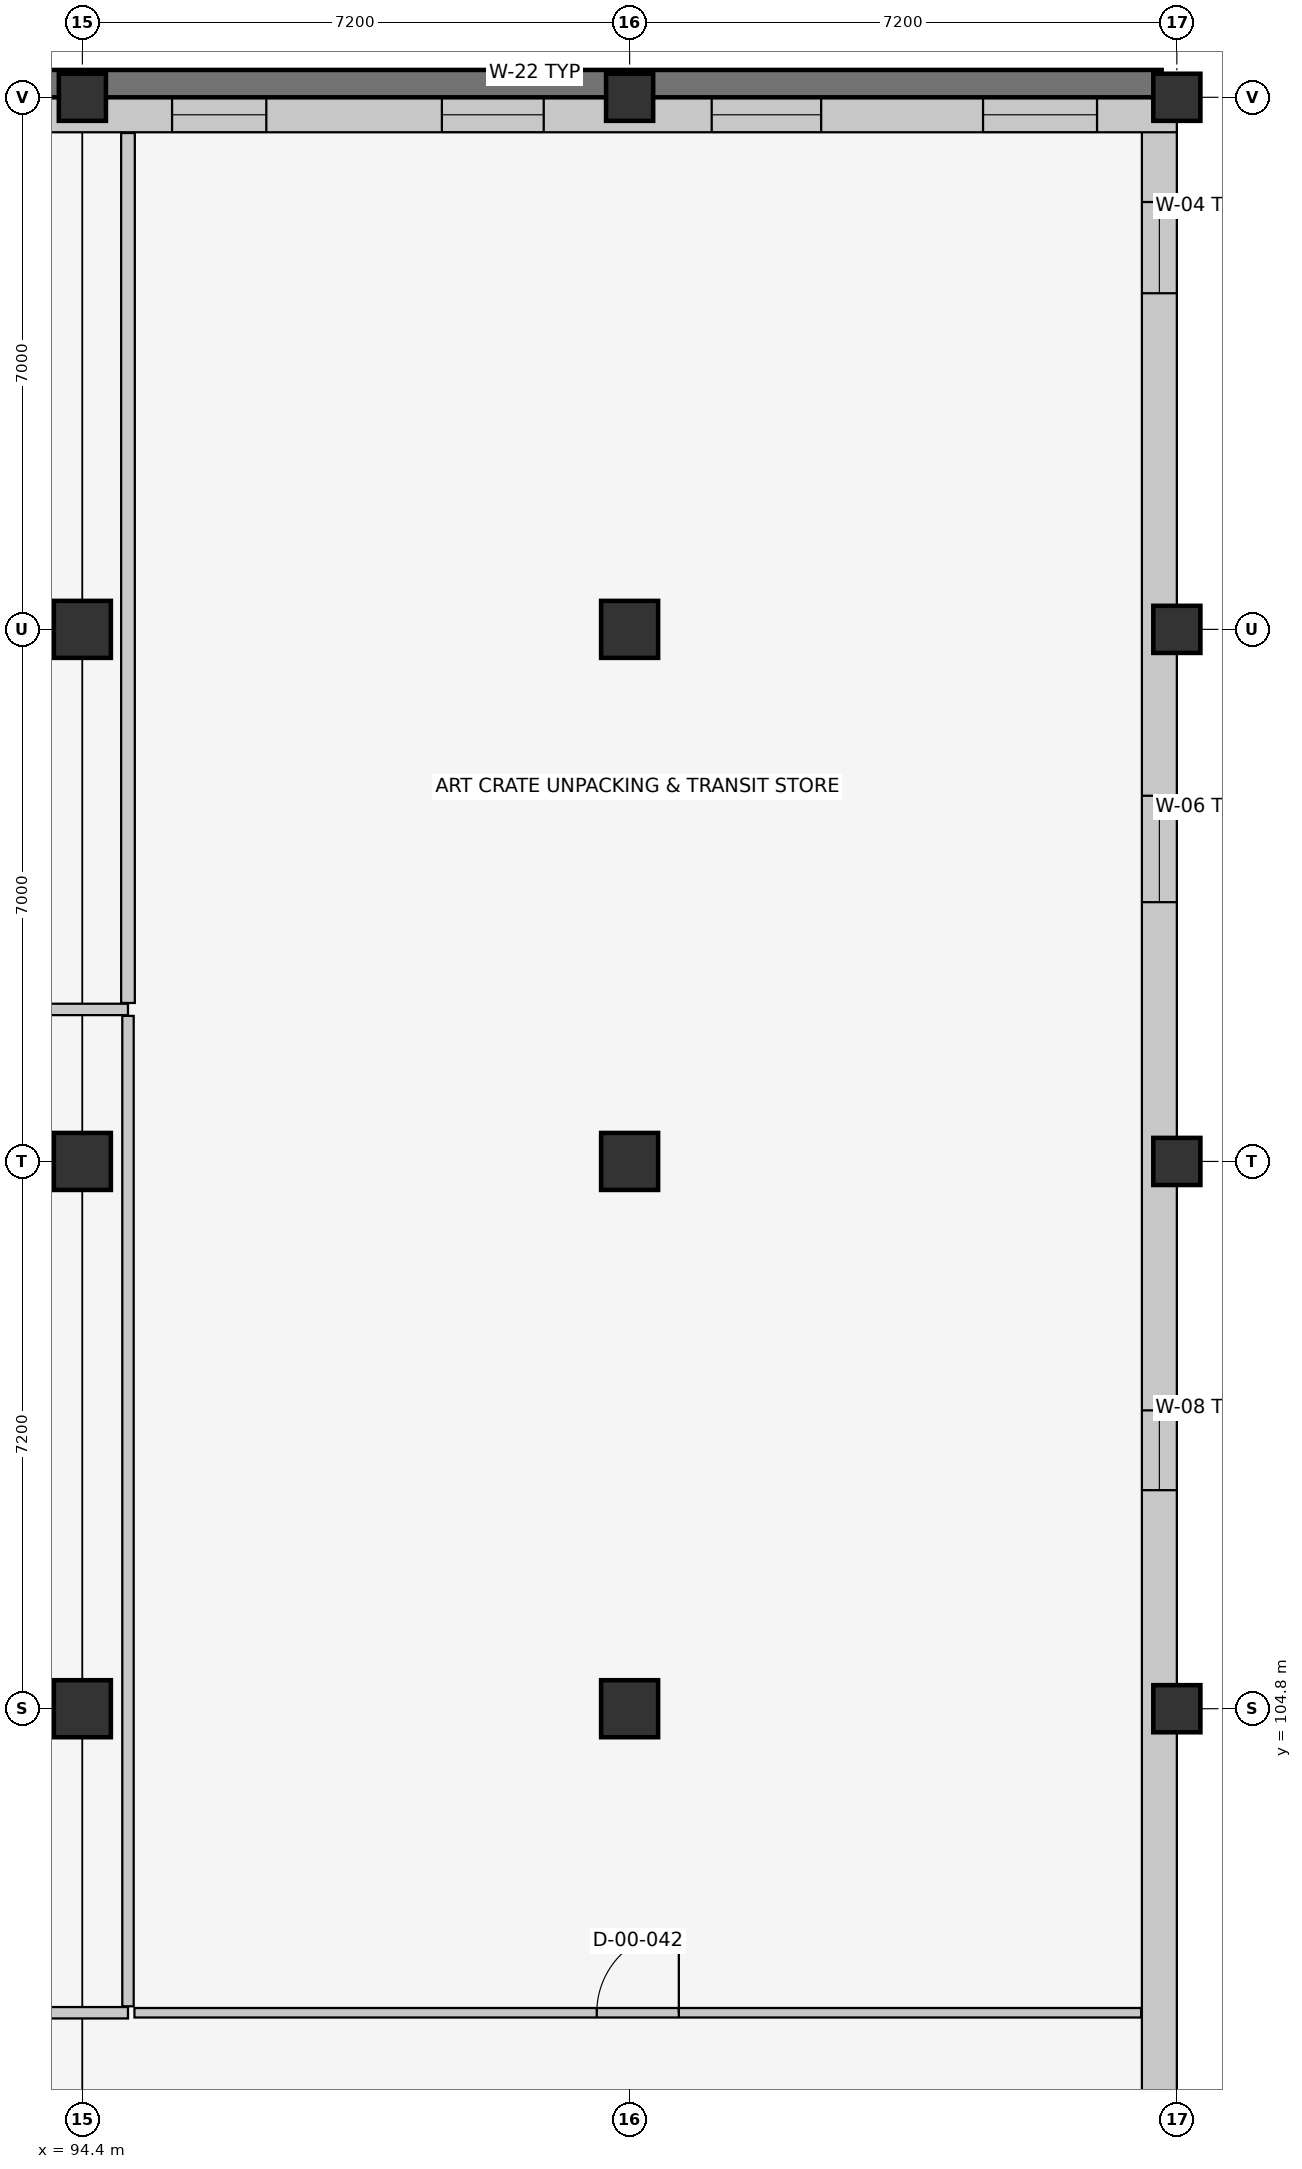
"""IFC4 building model, lengths in metres.
Left out: names, types, materials, properties, quantities, classifications, styles, units other than length and angle.
Written with IfcOpenShell. Run it as: python <this file> out.ifc"""

import sys

from ifc_helpers import new_model, si_unit, direction, frame, frame_2d, origin, origin_2d, place, context, subcontext, project, spatial, rectangle, circle, extrude, element, fill, save


model = new_model("IFC4")
c1 = context("Model", 3, precision=1e-05, world=origin(), true_north=direction((0.0, 1.0)))
c2 = subcontext(c1, "Body", "Model", "MODEL_VIEW")
j1 = project(units=[si_unit("LENGTHUNIT", "METRE"), si_unit("PLANEANGLEUNIT", "RADIAN")], contexts=[c1])
p1 = place(None, origin())
s1 = spatial("IfcSite", under=j1, at=p1, CompositionType="ELEMENT")
p2 = place(p1, origin())
s2 = spatial("IfcBuilding", under=s1, at=p2, CompositionType="ELEMENT")
p3 = place(p2, origin())
s3 = spatial("IfcBuildingStorey", under=s2, at=p3, CompositionType="ELEMENT", Elevation=0.0)
for number, where, z_axis, x_axis in (
    (1, (94.4, 104.8, 0.0), (0.0, 0.0, 1.0), (1.0, 0.0, 0.0)),
    (2, (94.4, 112.0, 0.0), (0.0, 0.0, 1.0), (1.0, 0.0, 0.0)),
    (3, (94.4, 119.0, 0.0), (0.0, 0.0, 1.0), (1.0, 0.0, 0.0)),
):
    element("IfcColumn", number, at=place(p3, frame(where, z_axis=z_axis, x_axis=x_axis)), inside=s3, PredefinedType="COLUMN", context=c2, shape_type="SweptSolid", body=[
        extrude(circle(Radius=0.375, at=origin_2d()), origin(), (0.0, 0.0, 1.0), 5.4),
    ])
p4 = place(p3, frame((94.4, 126.0, 0.0), z_axis=(0.0, 0.0, 1.0), x_axis=(1.0, 0.0, 0.0)))
e4 = element("IfcColumn", 4, at=p4, inside=s3, PredefinedType="COLUMN", context=c2, shape_type="SweptSolid", body=[
    extrude(rectangle(XDim=0.62, YDim=0.62, at=origin_2d()), origin(), (0.0, 0.0, 1.0), 5.4),
])
for number, where, z_axis, x_axis in (
    (5, (101.6, 104.8, 0.0), (0.0, 0.0, 1.0), (1.0, 0.0, 0.0)),
    (6, (101.6, 112.0, 0.0), (0.0, 0.0, 1.0), (1.0, 0.0, 0.0)),
    (7, (101.6, 119.0, 0.0), (0.0, 0.0, 1.0), (1.0, 0.0, 0.0)),
):
    element("IfcColumn", number, at=place(p3, frame(where, z_axis=z_axis, x_axis=x_axis)), inside=s3, PredefinedType="COLUMN", context=c2, shape_type="SweptSolid", body=[
        extrude(circle(Radius=0.375, at=origin_2d()), origin(), (0.0, 0.0, 1.0), 5.4),
    ])
for number, where, z_axis, x_axis in (
    (8, (101.6, 126.0, 0.0), (0.0, 0.0, 1.0), (1.0, 0.0, 0.0)),
    (9, (108.8, 104.8, 0.0), (0.0, 0.0, 1.0), (1.0, 0.0, 0.0)),
    (10, (108.8, 112.0, 0.0), (0.0, 0.0, 1.0), (1.0, 0.0, 0.0)),
    (11, (108.8, 119.0, 0.0), (0.0, 0.0, 1.0), (1.0, 0.0, 0.0)),
    (12, (108.8, 126.0, 0.0), (0.0, 0.0, 1.0), (1.0, 0.0, 0.0)),
):
    element("IfcColumn", number, at=place(p3, frame(where, z_axis=z_axis, x_axis=x_axis)), inside=s3, PredefinedType="COLUMN", context=c2, shape_type="SweptSolid", body=[
        extrude(rectangle(XDim=0.62, YDim=0.62, at=origin_2d()), origin(), (0.0, 0.0, 1.0), 5.4),
    ])
p5 = place(p3, frame((108.57, 126.0, 0.0), z_axis=(0.0, 0.0, 1.0), x_axis=(0.0, -1.0, 0.0)))
e13 = element("IfcWall", 13, at=p5, inside=s3, PredefinedType="SOLIDWALL", context=c2, shape_type="SweptSolid", body=[
    extrude(rectangle(XDim=35.6, YDim=0.46, at=frame_2d((17.8, 0.0))), origin(), (0.0, 0.0, 1.0), 4.515),
])
p6 = place(p5, frame((1.378, 0.0, 0.9)))
e14 = element("IfcOpeningElement", 14, at=p6, cuts=e13, PredefinedType="OPENING", context=c2, shape_type="SweptSolid", body=[
    extrude(rectangle(XDim=1.2, YDim=1.35, at=frame_2d((0.6, 0.675))), frame((0.0, 0.242, 0.0), z_axis=(0.0, -1.0, 0.0), x_axis=(1.0, 0.0, 0.0)), (0.0, 0.0, 1.0), 0.484),
])
p7 = place(p5, frame((9.189, 0.0, 0.9)))
e15 = element("IfcOpeningElement", 15, at=p7, cuts=e13, PredefinedType="OPENING", context=c2, shape_type="SweptSolid", body=[
    extrude(rectangle(XDim=1.4, YDim=1.35, at=frame_2d((0.7, 0.675))), frame((0.0, 0.242, 0.0), z_axis=(0.0, -1.0, 0.0), x_axis=(1.0, 0.0, 0.0)), (0.0, 0.0, 1.0), 0.484),
])
p8 = place(p5, frame((17.275, 0.0, 0.9)))
e16 = element("IfcOpeningElement", 16, at=p8, cuts=e13, PredefinedType="OPENING", context=c2, shape_type="SweptSolid", body=[
    extrude(rectangle(XDim=1.05, YDim=1.45, at=frame_2d((0.525, 0.725))), frame((0.0, 0.242, 0.0), z_axis=(0.0, -1.0, 0.0), x_axis=(1.0, 0.0, 0.0)), (0.0, 0.0, 1.0), 0.484),
])
p9 = place(p5, frame((32.897, 0.0, 0.9)))
e17 = element("IfcOpeningElement", 17, at=p9, cuts=e13, PredefinedType="OPENING", context=c2, shape_type="SweptSolid", body=[
    extrude(rectangle(XDim=1.45, YDim=1.45, at=frame_2d((0.725, 0.725))), frame((0.0, 0.242, 0.0), z_axis=(0.0, -1.0, 0.0), x_axis=(1.0, 0.0, 0.0)), (0.0, 0.0, 1.0), 0.484),
])
p10 = place(p3, frame((65.6, 125.77, 0.0), z_axis=(0.0, 0.0, 1.0), x_axis=(1.0, 0.0, 0.0)))
e18 = element("IfcWall", 18, at=p10, inside=s3, PredefinedType="SOLIDWALL", context=c2, shape_type="SweptSolid", body=[
    extrude(rectangle(XDim=43.2, YDim=0.46, at=frame_2d((21.6, 0.0))), origin(), (0.0, 0.0, 1.0), 4.455),
])
p11 = place(p10, frame((16.9, 0.0, 0.0)))
e19 = element("IfcOpeningElement", 19, at=p11, cuts=e18, PredefinedType="OPENING", context=c2, shape_type="SweptSolid", body=[
    extrude(rectangle(XDim=2.2, YDim=2.4, at=frame_2d((1.1, 1.2))), frame((0.0, 0.242, 0.0), z_axis=(0.0, -1.0, 0.0), x_axis=(1.0, 0.0, 0.0)), (0.0, 0.0, 1.0), 0.484),
])
p12 = place(p10, frame((1.35, 0.0, 0.9)))
e20 = element("IfcOpeningElement", 20, at=p12, cuts=e18, PredefinedType="OPENING", context=c2, shape_type="SweptSolid", body=[
    extrude(rectangle(XDim=0.9, YDim=1.6, at=frame_2d((0.45, 0.8))), frame((0.0, 0.242, 0.0), z_axis=(0.0, -1.0, 0.0), x_axis=(1.0, 0.0, 0.0)), (0.0, 0.0, 1.0), 0.484),
])
p13 = place(p10, frame((4.875, 0.0, 0.9)))
e21 = element("IfcOpeningElement", 21, at=p13, cuts=e18, PredefinedType="OPENING", context=c2, shape_type="SweptSolid", body=[
    extrude(rectangle(XDim=1.05, YDim=1.6, at=frame_2d((0.525, 0.8))), frame((0.0, 0.242, 0.0), z_axis=(0.0, -1.0, 0.0), x_axis=(1.0, 0.0, 0.0)), (0.0, 0.0, 1.0), 0.484),
])
p14 = place(p10, frame((8.425, 0.0, 0.9)))
e22 = element("IfcOpeningElement", 22, at=p14, cuts=e18, PredefinedType="OPENING", context=c2, shape_type="SweptSolid", body=[
    extrude(rectangle(XDim=1.15, YDim=1.6, at=frame_2d((0.575, 0.8))), frame((0.0, 0.242, 0.0), z_axis=(0.0, -1.0, 0.0), x_axis=(1.0, 0.0, 0.0)), (0.0, 0.0, 1.0), 0.484),
])
p15 = place(p10, frame((11.975, 0.0, 0.9)))
e23 = element("IfcOpeningElement", 23, at=p15, cuts=e18, PredefinedType="OPENING", context=c2, shape_type="SweptSolid", body=[
    extrude(rectangle(XDim=1.25, YDim=1.6, at=frame_2d((0.625, 0.8))), frame((0.0, 0.242, 0.0), z_axis=(0.0, -1.0, 0.0), x_axis=(1.0, 0.0, 0.0)), (0.0, 0.0, 1.0), 0.484),
])
p16 = place(p10, frame((22.9, 0.0, 0.9)))
e24 = element("IfcOpeningElement", 24, at=p16, cuts=e18, PredefinedType="OPENING", context=c2, shape_type="SweptSolid", body=[
    extrude(rectangle(XDim=1.0, YDim=1.75, at=frame_2d((0.5, 0.875))), frame((0.0, 0.242, 0.0), z_axis=(0.0, -1.0, 0.0), x_axis=(1.0, 0.0, 0.0)), (0.0, 0.0, 1.0), 0.484),
])
p17 = place(p10, frame((26.44, 0.0, 0.9)))
e25 = element("IfcOpeningElement", 25, at=p17, cuts=e18, PredefinedType="OPENING", context=c2, shape_type="SweptSolid", body=[
    extrude(rectangle(XDim=1.12, YDim=1.75, at=frame_2d((0.56, 0.875))), frame((0.0, 0.242, 0.0), z_axis=(0.0, -1.0, 0.0), x_axis=(1.0, 0.0, 0.0)), (0.0, 0.0, 1.0), 0.484),
])
p18 = place(p10, frame((29.98, 0.0, 0.9)))
e26 = element("IfcOpeningElement", 26, at=p18, cuts=e18, PredefinedType="OPENING", context=c2, shape_type="SweptSolid", body=[
    extrude(rectangle(XDim=1.24, YDim=1.75, at=frame_2d((0.62, 0.875))), frame((0.0, 0.242, 0.0), z_axis=(0.0, -1.0, 0.0), x_axis=(1.0, 0.0, 0.0)), (0.0, 0.0, 1.0), 0.484),
])
p19 = place(p10, frame((33.53, 0.0, 0.9)))
e27 = element("IfcOpeningElement", 27, at=p19, cuts=e18, PredefinedType="OPENING", context=c2, shape_type="SweptSolid", body=[
    extrude(rectangle(XDim=1.34, YDim=1.75, at=frame_2d((0.67, 0.875))), frame((0.0, 0.242, 0.0), z_axis=(0.0, -1.0, 0.0), x_axis=(1.0, 0.0, 0.0)), (0.0, 0.0, 1.0), 0.484),
])
p20 = place(p10, frame((37.08, 0.0, 0.9)))
e28 = element("IfcOpeningElement", 28, at=p20, cuts=e18, PredefinedType="OPENING", context=c2, shape_type="SweptSolid", body=[
    extrude(rectangle(XDim=1.44, YDim=1.75, at=frame_2d((0.72, 0.875))), frame((0.0, 0.242, 0.0), z_axis=(0.0, -1.0, 0.0), x_axis=(1.0, 0.0, 0.0)), (0.0, 0.0, 1.0), 0.484),
])
p21 = place(p10, frame((40.65, 0.0, 0.9)))
e29 = element("IfcOpeningElement", 29, at=p21, cuts=e18, PredefinedType="OPENING", context=c2, shape_type="SweptSolid", body=[
    extrude(rectangle(XDim=1.5, YDim=1.75, at=frame_2d((0.75, 0.875))), frame((0.0, 0.242, 0.0), z_axis=(0.0, -1.0, 0.0), x_axis=(1.0, 0.0, 0.0)), (0.0, 0.0, 1.0), 0.484),
])
p22 = place(p3, frame((87.2, 126.18, -0.8), z_axis=(0.0, 0.0, 1.0), x_axis=(1.0, 0.0, 0.0)))
e30 = element("IfcWall", 30, at=p22, inside=s3, PredefinedType="USERDEFINED", context=c2, shape_type="SweptSolid", body=[
    extrude(rectangle(XDim=21.4, YDim=0.36, at=frame_2d((10.7, 0.0))), origin(), (0.0, 0.0, 1.0), 1.35),
])
p23 = place(p3, frame((80.0, 100.8, 0.0), z_axis=(0.0, 0.0, 1.0), x_axis=(1.0, 0.0, 0.0)))
e31 = element("IfcWall", 31, at=p23, inside=s3, PredefinedType="PARTITIONING", context=c2, shape_type="SweptSolid", body=[
    extrude(rectangle(XDim=15.0, YDim=0.15, at=frame_2d((7.5, 0.0))), origin(), (0.0, 0.0, 1.0), 5.12),
])
p24 = place(p23, frame((6.94, 0.0, 0.0)))
e32 = element("IfcOpeningElement", 32, at=p24, cuts=e31, PredefinedType="OPENING", context=c2, shape_type="SweptSolid", body=[
    extrude(rectangle(XDim=1.12, YDim=2.15, at=frame_2d((0.56, 1.075))), frame((0.0, 0.087, 0.0), z_axis=(0.0, -1.0, 0.0), x_axis=(1.0, 0.0, 0.0)), (0.0, 0.0, 1.0), 0.174),
])
p25 = place(p3, frame((80.0, 114.0, 0.0), z_axis=(0.0, 0.0, 1.0), x_axis=(1.0, 0.0, 0.0)))
e33 = element("IfcWall", 33, at=p25, inside=s3, PredefinedType="PARTITIONING", context=c2, shape_type="SweptSolid", body=[
    extrude(rectangle(XDim=15.0, YDim=0.15, at=frame_2d((7.5, 0.0))), origin(), (0.0, 0.0, 1.0), 5.12),
])
p26 = place(p3, frame((95.0, 100.885, 0.0), z_axis=(0.0, 0.0, 1.0), x_axis=(0.0, 1.0, 0.0)))
e34 = element("IfcWall", 34, at=p26, inside=s3, PredefinedType="PARTITIONING", context=c2, shape_type="SweptSolid", body=[
    extrude(rectangle(XDim=13.03, YDim=0.15, at=frame_2d((6.515, 0.0))), origin(), (0.0, 0.0, 1.0), 5.12),
])
p27 = place(p3, frame((95.0, 114.085, 0.0), z_axis=(0.0, 0.0, 1.0), x_axis=(0.0, 1.0, 0.0)))
e35 = element("IfcWall", 35, at=p27, inside=s3, PredefinedType="PARTITIONING", context=c2, shape_type="SweptSolid", body=[
    extrude(rectangle(XDim=11.445, YDim=0.18, at=frame_2d((5.723, 0.0))), origin(), (0.0, 0.0, 1.0), 5.16),
])
p28 = place(p3, frame((95.085, 100.8, 0.0), z_axis=(0.0, 0.0, 1.0), x_axis=(1.0, 0.0, 0.0)))
e36 = element("IfcWall", 36, at=p28, inside=s3, PredefinedType="PARTITIONING", context=c2, shape_type="SweptSolid", body=[
    extrude(rectangle(XDim=13.245, YDim=0.125, at=frame_2d((6.623, 0.0))), origin(), (0.0, 0.0, 1.0), 5.12),
])
p29 = place(p28, frame((6.083, 0.0, 0.0)))
e37 = element("IfcOpeningElement", 37, at=p29, cuts=e36, PredefinedType="OPENING", context=c2, shape_type="SweptSolid", body=[
    extrude(rectangle(XDim=1.08, YDim=2.15, at=frame_2d((0.54, 1.075))), frame((0.0, 0.074, 0.0), z_axis=(0.0, -1.0, 0.0), x_axis=(1.0, 0.0, 0.0)), (0.0, 0.0, 1.0), 0.149),
])
p30 = place(p6, origin())
e38 = element("IfcWindow", 38, at=p30, inside=s3, PartitioningType="SINGLE_PANEL", PredefinedType="WINDOW", context=c2, shape_type="SweptSolid", body=[
    extrude(rectangle(XDim=1.2, YDim=1.35, at=frame_2d((0.6, 0.675))), frame((0.0, 0.03, 0.0), z_axis=(0.0, -1.0, 0.0), x_axis=(1.0, 0.0, 0.0)), (0.0, 0.0, 1.0), 0.06),
])
fill(e14, e38)
p31 = place(p7, origin())
e39 = element("IfcWindow", 39, at=p31, inside=s3, PartitioningType="SINGLE_PANEL", PredefinedType="WINDOW", context=c2, shape_type="SweptSolid", body=[
    extrude(rectangle(XDim=1.4, YDim=1.35, at=frame_2d((0.7, 0.675))), frame((0.0, 0.03, 0.0), z_axis=(0.0, -1.0, 0.0), x_axis=(1.0, 0.0, 0.0)), (0.0, 0.0, 1.0), 0.06),
])
fill(e15, e39)
p32 = place(p8, origin())
e40 = element("IfcWindow", 40, at=p32, inside=s3, PartitioningType="SINGLE_PANEL", PredefinedType="WINDOW", context=c2, shape_type="SweptSolid", body=[
    extrude(rectangle(XDim=1.05, YDim=1.45, at=frame_2d((0.525, 0.725))), frame((0.0, 0.03, 0.0), z_axis=(0.0, -1.0, 0.0), x_axis=(1.0, 0.0, 0.0)), (0.0, 0.0, 1.0), 0.06),
])
fill(e16, e40)
p33 = place(p18, origin())
e41 = element("IfcWindow", 41, at=p33, inside=s3, PartitioningType="SINGLE_PANEL", PredefinedType="WINDOW", context=c2, shape_type="SweptSolid", body=[
    extrude(rectangle(XDim=1.24, YDim=1.75, at=frame_2d((0.62, 0.875))), frame((0.0, 0.03, 0.0), z_axis=(0.0, -1.0, 0.0), x_axis=(1.0, 0.0, 0.0)), (0.0, 0.0, 1.0), 0.06),
])
fill(e26, e41)
p34 = place(p19, origin())
e42 = element("IfcWindow", 42, at=p34, inside=s3, PartitioningType="SINGLE_PANEL", PredefinedType="WINDOW", context=c2, shape_type="SweptSolid", body=[
    extrude(rectangle(XDim=1.34, YDim=1.75, at=frame_2d((0.67, 0.875))), frame((0.0, 0.03, 0.0), z_axis=(0.0, -1.0, 0.0), x_axis=(1.0, 0.0, 0.0)), (0.0, 0.0, 1.0), 0.06),
])
fill(e27, e42)
p35 = place(p20, origin())
e43 = element("IfcWindow", 43, at=p35, inside=s3, PartitioningType="SINGLE_PANEL", PredefinedType="WINDOW", context=c2, shape_type="SweptSolid", body=[
    extrude(rectangle(XDim=1.44, YDim=1.75, at=frame_2d((0.72, 0.875))), frame((0.0, 0.03, 0.0), z_axis=(0.0, -1.0, 0.0), x_axis=(1.0, 0.0, 0.0)), (0.0, 0.0, 1.0), 0.06),
])
fill(e28, e43)
p36 = place(p21, origin())
e44 = element("IfcWindow", 44, at=p36, inside=s3, PartitioningType="SINGLE_PANEL", PredefinedType="WINDOW", context=c2, shape_type="SweptSolid", body=[
    extrude(rectangle(XDim=1.5, YDim=1.75, at=frame_2d((0.75, 0.875))), frame((0.0, 0.03, 0.0), z_axis=(0.0, -1.0, 0.0), x_axis=(1.0, 0.0, 0.0)), (0.0, 0.0, 1.0), 0.06),
])
fill(e29, e44)
p37 = place(p29, origin())
e45 = element("IfcDoor", 45, at=p37, inside=s3, OperationType="SINGLE_SWING_RIGHT", PredefinedType="DOOR", context=c2, shape_type="SweptSolid", body=[
    extrude(rectangle(XDim=1.08, YDim=2.15, at=frame_2d((0.54, 1.075))), frame((0.0, 0.025, 0.0), z_axis=(0.0, -1.0, 0.0), x_axis=(1.0, 0.0, 0.0)), (0.0, 0.0, 1.0), 0.05),
])
fill(e37, e45)
save(model, sys.argv[1])
